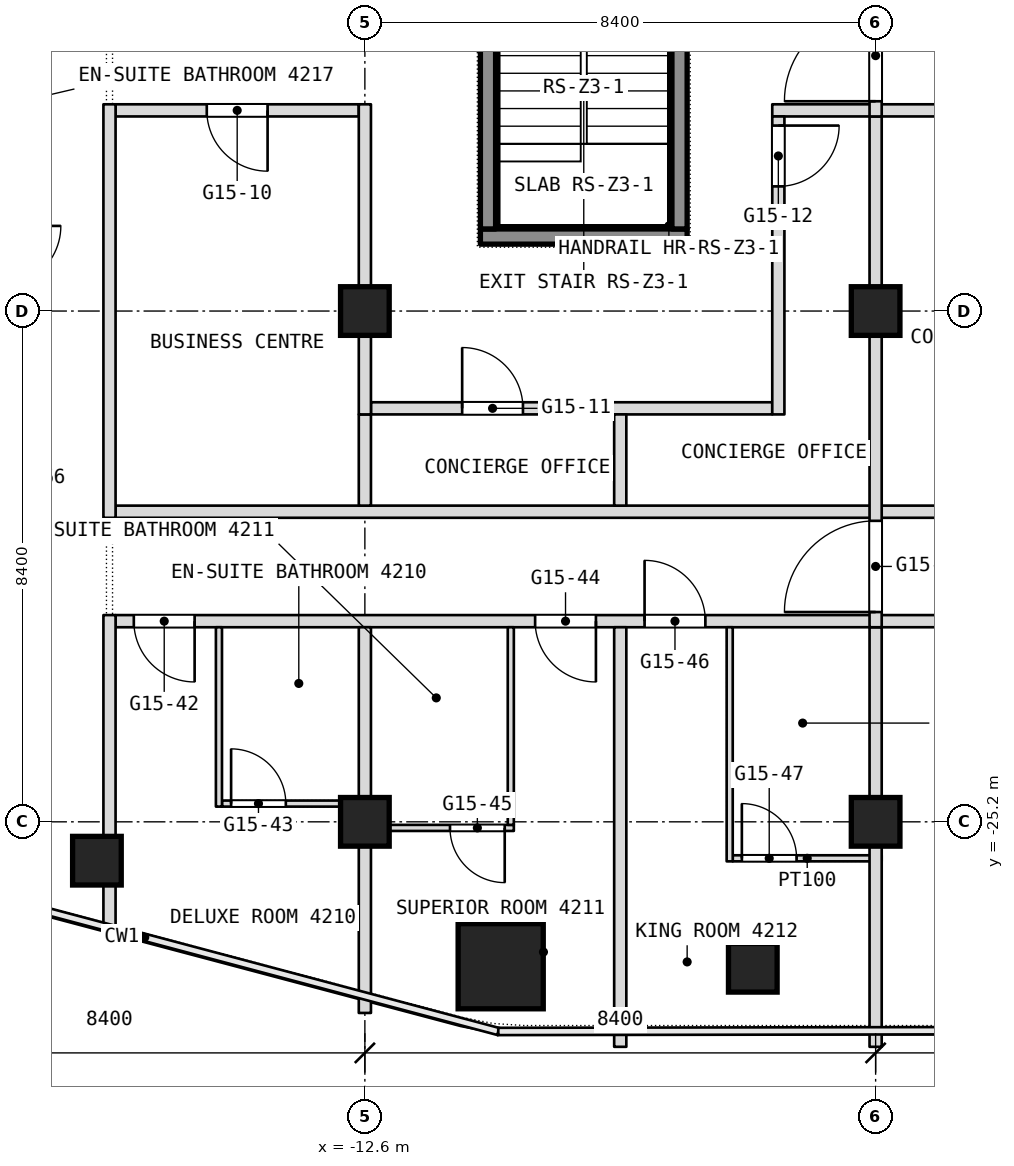
"""IFC4 building model, lengths in metres.
Left out: names, types, materials, properties, quantities, classifications, styles, units other than length and angle.
Written with IfcOpenShell. Run it as: python <this file> out.ifc"""

import sys

from ifc_helpers import new_model, si_unit, direction, frame, frame_2d, origin, origin_2d, place, context, subcontext, project, spatial, rectangle, extrude, element, fill, save


model = new_model("IFC4")
c1 = context("Model", 3, precision=1e-05, world=origin(), true_north=direction((0.0, 1.0)))
c2 = subcontext(c1, "Body", "Model", "MODEL_VIEW")
j1 = project(units=[si_unit("LENGTHUNIT", "METRE"), si_unit("PLANEANGLEUNIT", "RADIAN")], contexts=[c1])
p1 = place(None, origin())
s1 = spatial("IfcSite", under=j1, at=p1, CompositionType="ELEMENT")
p2 = place(p1, origin())
s2 = spatial("IfcBuilding", under=s1, at=p2, CompositionType="ELEMENT")
p3 = place(p2, frame((0.0, 0.0, 187.7)))
s3 = spatial("IfcBuildingStorey", under=s2, at=p3, CompositionType="ELEMENT", Elevation=187.7)
p4 = place(p3, frame((-10.366, -27.575, 0.0), z_axis=(0.0, 0.0, 1.0), x_axis=(1.0, 0.0, 0.0)))
e1 = element("IfcColumn", 1, at=p4, inside=s3, PredefinedType="COLUMN", context=c2, shape_type="SweptSolid", body=[
    extrude(rectangle(XDim=1.4, YDim=1.4, at=origin_2d()), origin(), (0.0, 0.0, 1.0), 3.6),
])
for number, where, z_axis, x_axis in (
    (2, (-12.6, -25.2, 0.0), (0.0, 0.0, 1.0), (1.0, 0.0, 0.0)),
    (3, (-12.6, -16.8, 0.0), (0.0, 0.0, 1.0), (1.0, 0.0, 0.0)),
    (4, (-4.2, -25.2, 0.0), (0.0, 0.0, 1.0), (1.0, 0.0, 0.0)),
    (5, (-4.2, -16.8, 0.0), (0.0, 0.0, 1.0), (1.0, 0.0, 0.0)),
    (6, (-6.22, -27.6, 0.0), (0.0, 0.0, 1.0), (1.0, 0.0, 0.0)),
    (7, (-17.007, -25.839, 0.0), (0.0, 0.0, 1.0), (1.0, 0.0, 0.0)),
):
    element("IfcColumn", number, at=place(p3, frame(where, z_axis=z_axis, x_axis=x_axis)), inside=s3, PredefinedType="COLUMN", context=c2, shape_type="SweptSolid", body=[
        extrude(rectangle(XDim=0.8, YDim=0.8, at=origin_2d()), origin(), (0.0, 0.0, 1.0), 3.6),
    ])
p5 = place(p3, frame((-6.55, -25.8, 0.0), z_axis=(0.0, 0.0, 1.0), x_axis=(1.0, 0.0, 0.0)))
e8 = element("IfcWall", 8, at=p5, inside=s3, PredefinedType="PARTITIONING", context=c2, shape_type="SweptSolid", body=[
    extrude(rectangle(XDim=2.45, YDim=0.1, at=frame_2d((1.225, 0.0))), origin(), (0.0, 0.0, 1.0), 3.34),
])
p6 = place(p5, frame((0.15, 0.0, 0.0)))
e9 = element("IfcOpeningElement", 9, at=p6, cuts=e8, PredefinedType="OPENING", context=c2, shape_type="SweptSolid", body=[
    extrude(rectangle(XDim=0.9, YDim=2.1, at=frame_2d((0.45, 1.05))), frame((0.0, 0.05, 0.0), z_axis=(0.0, -1.0, 0.0), x_axis=(1.0, 0.0, 0.0)), (0.0, 0.0, 1.0), 0.1),
])
p7 = place(p3, frame((-12.5, -25.3, 0.0), z_axis=(0.0, 0.0, 1.0), x_axis=(1.0, 0.0, 0.0)))
e10 = element("IfcWall", 10, at=p7, inside=s3, PredefinedType="PARTITIONING", context=c2, shape_type="SweptSolid", body=[
    extrude(rectangle(XDim=2.35, YDim=0.1, at=frame_2d((1.175, 0.0))), origin(), (0.0, 0.0, 1.0), 2.94),
])
p8 = place(p7, frame((1.3, 0.0, 0.0)))
e11 = element("IfcOpeningElement", 11, at=p8, cuts=e10, PredefinedType="OPENING", context=c2, shape_type="SweptSolid", body=[
    extrude(rectangle(XDim=0.9, YDim=2.1, at=frame_2d((0.45, 1.05))), frame((0.0, 0.05, 0.0), z_axis=(0.0, -1.0, 0.0), x_axis=(1.0, 0.0, 0.0)), (0.0, 0.0, 1.0), 0.1),
])
p9 = place(p3, frame((-14.95, -24.9, 0.0), z_axis=(0.0, 0.0, 1.0), x_axis=(1.0, 0.0, 0.0)))
e12 = element("IfcWall", 12, at=p9, inside=s3, PredefinedType="PARTITIONING", context=c2, shape_type="SweptSolid", body=[
    extrude(rectangle(XDim=2.45, YDim=0.1, at=frame_2d((1.225, 0.0))), origin(), (0.0, 0.0, 1.0), 3.34),
])
p10 = place(p9, frame((0.15, 0.0, 0.0)))
e13 = element("IfcOpeningElement", 13, at=p10, cuts=e12, PredefinedType="OPENING", context=c2, shape_type="SweptSolid", body=[
    extrude(rectangle(XDim=0.9, YDim=2.1, at=frame_2d((0.45, 1.05))), frame((0.0, 0.05, 0.0), z_axis=(0.0, -1.0, 0.0), x_axis=(1.0, 0.0, 0.0)), (0.0, 0.0, 1.0), 0.1),
])
p11 = place(p3, frame((-16.7, -21.9, 0.0), z_axis=(0.0, 0.0, 1.0), x_axis=(1.0, 0.0, 0.0)))
e14 = element("IfcWall", 14, at=p11, inside=s3, PredefinedType="PARTITIONING", context=c2, shape_type="SweptSolid", body=[
    extrude(rectangle(XDim=33.4, YDim=0.2, at=frame_2d((16.7, 0.0))), origin(), (0.0, 0.0, 1.0), 3.34),
])
p12 = place(p11, frame((0.3, 0.0, 0.0)))
e15 = element("IfcOpeningElement", 15, at=p12, cuts=e14, PredefinedType="OPENING", context=c2, shape_type="SweptSolid", body=[
    extrude(rectangle(XDim=1.0, YDim=2.1, at=frame_2d((0.5, 1.05))), frame((0.0, 0.1, 0.0), z_axis=(0.0, -1.0, 0.0), x_axis=(1.0, 0.0, 0.0)), (0.0, 0.0, 1.0), 0.2),
])
p13 = place(p11, frame((6.9, 0.0, 0.0)))
e16 = element("IfcOpeningElement", 16, at=p13, cuts=e14, PredefinedType="OPENING", context=c2, shape_type="SweptSolid", body=[
    extrude(rectangle(XDim=1.0, YDim=2.1, at=frame_2d((0.5, 1.05))), frame((0.0, 0.1, 0.0), z_axis=(0.0, -1.0, 0.0), x_axis=(1.0, 0.0, 0.0)), (0.0, 0.0, 1.0), 0.2),
])
p14 = place(p11, frame((8.7, 0.0, 0.0)))
e17 = element("IfcOpeningElement", 17, at=p14, cuts=e14, PredefinedType="OPENING", context=c2, shape_type="SweptSolid", body=[
    extrude(rectangle(XDim=1.0, YDim=2.1, at=frame_2d((0.5, 1.05))), frame((0.0, 0.1, 0.0), z_axis=(0.0, -1.0, 0.0), x_axis=(1.0, 0.0, 0.0)), (0.0, 0.0, 1.0), 0.2),
])
p15 = place(p11, frame((15.8, 0.0, 0.0)))
e18 = element("IfcOpeningElement", 18, at=p15, cuts=e14, PredefinedType="OPENING", context=c2, shape_type="SweptSolid", body=[
    extrude(rectangle(XDim=1.8, YDim=2.1, at=frame_2d((0.9, 1.05))), frame((0.0, 0.1, 0.0), z_axis=(0.0, -1.0, 0.0), x_axis=(1.0, 0.0, 0.0)), (0.0, 0.0, 1.0), 0.2),
])
p16 = place(p11, frame((26.65, 0.0, 0.0)))
e19 = element("IfcOpeningElement", 19, at=p16, cuts=e14, PredefinedType="OPENING", context=c2, shape_type="SweptSolid", body=[
    extrude(rectangle(XDim=1.1, YDim=2.1, at=frame_2d((0.55, 1.05))), frame((0.0, 0.1, 0.0), z_axis=(0.0, -1.0, 0.0), x_axis=(1.0, 0.0, 0.0)), (0.0, 0.0, 1.0), 0.2),
])
p17 = place(p11, frame((29.7, 0.0, 0.0)))
e20 = element("IfcOpeningElement", 20, at=p17, cuts=e14, PredefinedType="OPENING", context=c2, shape_type="SweptSolid", body=[
    extrude(rectangle(XDim=1.0, YDim=2.1, at=frame_2d((0.5, 1.05))), frame((0.0, 0.1, 0.0), z_axis=(0.0, -1.0, 0.0), x_axis=(1.0, 0.0, 0.0)), (0.0, 0.0, 1.0), 0.2),
])
p18 = place(p3, frame((-16.7, -20.1, 0.0), z_axis=(0.0, 0.0, 1.0), x_axis=(1.0, 0.0, 0.0)))
e21 = element("IfcWall", 21, at=p18, inside=s3, PredefinedType="PARTITIONING", context=c2, shape_type="SweptSolid", body=[
    extrude(rectangle(XDim=33.4, YDim=0.2, at=frame_2d((16.7, 0.0))), origin(), (0.0, 0.0, 1.0), 3.34),
])
p19 = place(p3, frame((-12.5, -18.4, 0.0), z_axis=(0.0, 0.0, 1.0), x_axis=(1.0, 0.0, 0.0)))
e22 = element("IfcWall", 22, at=p19, inside=s3, PredefinedType="PARTITIONING", context=c2, shape_type="SweptSolid", body=[
    extrude(rectangle(XDim=6.6, YDim=0.2, at=frame_2d((3.3, 0.0))), origin(), (0.0, 0.0, 1.0), 3.34),
])
p20 = place(p19, frame((1.5, 0.0, 0.0)))
e23 = element("IfcOpeningElement", 23, at=p20, cuts=e22, PredefinedType="OPENING", context=c2, shape_type="SweptSolid", body=[
    extrude(rectangle(XDim=1.0, YDim=2.1, at=frame_2d((0.5, 1.05))), frame((0.0, 0.1, 0.0), z_axis=(0.0, -1.0, 0.0), x_axis=(1.0, 0.0, 0.0)), (0.0, 0.0, 1.0), 0.2),
])
p21 = place(p3, frame((-16.7, -13.5, 0.0), z_axis=(0.0, 0.0, 1.0), x_axis=(1.0, 0.0, 0.0)))
e24 = element("IfcWall", 24, at=p21, inside=s3, PredefinedType="PARTITIONING", context=c2, shape_type="SweptSolid", body=[
    extrude(rectangle(XDim=4.0, YDim=0.2, at=frame_2d((2.0, 0.0))), origin(), (0.0, 0.0, 1.0), 3.34),
])
p22 = place(p21, frame((1.5, 0.0, 0.0)))
e25 = element("IfcOpeningElement", 25, at=p22, cuts=e24, PredefinedType="OPENING", context=c2, shape_type="SweptSolid", body=[
    extrude(rectangle(XDim=1.0, YDim=2.1, at=frame_2d((0.5, 1.05))), frame((0.0, 0.1, 0.0), z_axis=(0.0, -1.0, 0.0), x_axis=(1.0, 0.0, 0.0)), (0.0, 0.0, 1.0), 0.2),
])
p23 = place(p3, frame((-5.9, -13.5, 0.0), z_axis=(0.0, 0.0, 1.0), x_axis=(1.0, 0.0, 0.0)))
e26 = element("IfcWall", 26, at=p23, inside=s3, PredefinedType="PARTITIONING", context=c2, shape_type="SweptSolid", body=[
    extrude(rectangle(XDim=11.6, YDim=0.2, at=frame_2d((5.8, 0.0))), origin(), (0.0, 0.0, 1.0), 3.34),
])
p24 = place(p23, frame((3.3, 0.0, 0.0)))
e27 = element("IfcOpeningElement", 27, at=p24, cuts=e26, PredefinedType="OPENING", context=c2, shape_type="SweptSolid", body=[
    extrude(rectangle(XDim=1.0, YDim=2.1, at=frame_2d((0.5, 1.05))), frame((0.0, 0.1, 0.0), z_axis=(0.0, -1.0, 0.0), x_axis=(1.0, 0.0, 0.0)), (0.0, 0.0, 1.0), 0.2),
])
p25 = place(p23, frame((7.5, 0.0, 0.0)))
e28 = element("IfcOpeningElement", 28, at=p25, cuts=e26, PredefinedType="OPENING", context=c2, shape_type="SweptSolid", body=[
    extrude(rectangle(XDim=1.0, YDim=2.1, at=frame_2d((0.5, 1.05))), frame((0.0, 0.1, 0.0), z_axis=(0.0, -1.0, 0.0), x_axis=(1.0, 0.0, 0.0)), (0.0, 0.0, 1.0), 0.2),
])
p26 = place(p23, frame((10.45, 0.0, 0.0)))
e29 = element("IfcOpeningElement", 29, at=p26, cuts=e26, PredefinedType="OPENING", context=c2, shape_type="SweptSolid", body=[
    extrude(rectangle(XDim=1.0, YDim=2.1, at=frame_2d((0.5, 1.05))), frame((0.0, 0.1, 0.0), z_axis=(0.0, -1.0, 0.0), x_axis=(1.0, 0.0, 0.0)), (0.0, 0.0, 1.0), 0.2),
])
p27 = place(p3, frame((-4.2, -28.9, 0.0), z_axis=(0.0, 0.0, 1.0), x_axis=(0.0, 1.0, 0.0)))
e30 = element("IfcWall", 30, at=p27, inside=s3, PredefinedType="PARTITIONING", context=c2, shape_type="SweptSolid", body=[
    extrude(rectangle(XDim=6.9, YDim=0.2, at=frame_2d((3.45, 0.0))), origin(), (0.0, 0.0, 1.0), 3.34),
])
p28 = place(p3, frame((-4.2, -22.0, 0.0), z_axis=(0.0, 0.0, 1.0), x_axis=(0.0, 1.0, 0.0)))
e31 = element("IfcWall", 31, at=p28, inside=s3, PredefinedType="PARTITIONING", context=c2, shape_type="SweptSolid", body=[
    extrude(rectangle(XDim=8.4, YDim=0.2, at=frame_2d((4.2, 0.0))), origin(), (0.0, 0.0, 1.0), 3.34),
])
p29 = place(p28, frame((0.25, 0.0, 0.0)))
e32 = element("IfcOpeningElement", 32, at=p29, cuts=e31, PredefinedType="OPENING", context=c2, shape_type="SweptSolid", body=[
    extrude(rectangle(XDim=1.5, YDim=2.1, at=frame_2d((0.75, 1.05))), frame((0.0, 0.1, 0.0), z_axis=(0.0, -1.0, 0.0), x_axis=(1.0, 0.0, 0.0)), (0.0, 0.0, 1.0), 0.2),
])
p30 = place(p3, frame((-4.2, -13.6, 0.0), z_axis=(0.0, 0.0, 1.0), x_axis=(0.0, 1.0, 0.0)))
e33 = element("IfcWall", 33, at=p30, inside=s3, PredefinedType="PARTITIONING", context=c2, shape_type="SweptSolid", body=[
    extrude(rectangle(XDim=13.6, YDim=0.2, at=frame_2d((6.8, 0.0))), origin(), (0.0, 0.0, 1.0), 3.34),
])
p31 = place(p30, frame((11.95, 0.0, 0.0)))
e34 = element("IfcOpeningElement", 34, at=p31, cuts=e33, PredefinedType="OPENING", context=c2, shape_type="SweptSolid", body=[
    extrude(rectangle(XDim=1.5, YDim=2.1, at=frame_2d((0.75, 1.05))), frame((0.0, 0.1, 0.0), z_axis=(0.0, -1.0, 0.0), x_axis=(1.0, 0.0, 0.0)), (0.0, 0.0, 1.0), 0.2),
])
p32 = place(p30, frame((0.25, 0.0, 0.0)))
e35 = element("IfcOpeningElement", 35, at=p32, cuts=e33, PredefinedType="OPENING", context=c2, shape_type="SweptSolid", body=[
    extrude(rectangle(XDim=1.5, YDim=2.1, at=frame_2d((0.75, 1.05))), frame((0.0, 0.1, 0.0), z_axis=(0.0, -1.0, 0.0), x_axis=(1.0, 0.0, 0.0)), (0.0, 0.0, 1.0), 0.2),
])
p33 = place(p3, frame((-5.8, -18.5, 0.0), z_axis=(0.0, 0.0, 1.0), x_axis=(0.0, 1.0, 0.0)))
e36 = element("IfcWall", 36, at=p33, inside=s3, PredefinedType="PARTITIONING", context=c2, shape_type="SweptSolid", body=[
    extrude(rectangle(XDim=4.9, YDim=0.2, at=frame_2d((2.45, 0.0))), origin(), (0.0, 0.0, 1.0), 3.34),
])
p34 = place(p33, frame((3.75, 0.0, 0.0)))
e37 = element("IfcOpeningElement", 37, at=p34, cuts=e36, PredefinedType="OPENING", context=c2, shape_type="SweptSolid", body=[
    extrude(rectangle(XDim=1.0, YDim=2.1, at=frame_2d((0.5, 1.05))), frame((0.0, 0.1, 0.0), z_axis=(0.0, -1.0, 0.0), x_axis=(1.0, 0.0, 0.0)), (0.0, 0.0, 1.0), 0.2),
])
p35 = place(p3, frame((-6.6, -25.85, 0.0), z_axis=(0.0, 0.0, 1.0), x_axis=(0.0, 1.0, 0.0)))
e38 = element("IfcWall", 38, at=p35, inside=s3, PredefinedType="PARTITIONING", context=c2, shape_type="SweptSolid", body=[
    extrude(rectangle(XDim=3.85, YDim=0.1, at=frame_2d((1.925, 0.0))), origin(), (0.0, 0.0, 1.0), 3.34),
])
p36 = place(p3, frame((-8.4, -28.9, 0.0), z_axis=(0.0, 0.0, 1.0), x_axis=(0.0, 1.0, 0.0)))
e39 = element("IfcWall", 39, at=p36, inside=s3, PredefinedType="PARTITIONING", context=c2, shape_type="SweptSolid", body=[
    extrude(rectangle(XDim=6.9, YDim=0.2, at=frame_2d((3.45, 0.0))), origin(), (0.0, 0.0, 1.0), 3.34),
])
p37 = place(p3, frame((-8.4, -20.0, 0.0), z_axis=(0.0, 0.0, 1.0), x_axis=(0.0, 1.0, 0.0)))
e40 = element("IfcWall", 40, at=p37, inside=s3, PredefinedType="PARTITIONING", context=c2, shape_type="SweptSolid", body=[
    extrude(rectangle(XDim=1.5, YDim=0.2, at=frame_2d((0.75, 0.0))), origin(), (0.0, 0.0, 1.0), 3.34),
])
p38 = place(p3, frame((-10.2, -25.25, 0.0), z_axis=(0.0, 0.0, 1.0), x_axis=(0.0, 1.0, 0.0)))
e41 = element("IfcWall", 41, at=p38, inside=s3, PredefinedType="PARTITIONING", context=c2, shape_type="SweptSolid", body=[
    extrude(rectangle(XDim=3.25, YDim=0.1, at=frame_2d((1.625, 0.0))), origin(), (0.0, 0.0, 1.0), 3.34),
])
p39 = place(p3, frame((-12.6, -28.343, 0.0), z_axis=(0.0, 0.0, 1.0), x_axis=(0.0, 1.0, 0.0)))
e42 = element("IfcWall", 42, at=p39, inside=s3, PredefinedType="PARTITIONING", context=c2, shape_type="SweptSolid", body=[
    extrude(rectangle(XDim=6.343, YDim=0.2, at=frame_2d((3.171, 0.0))), origin(), (0.0, 0.0, 1.0), 3.34),
])
p40 = place(p3, frame((-12.6, -20.0, 0.0), z_axis=(0.0, 0.0, 1.0), x_axis=(0.0, 1.0, 0.0)))
e43 = element("IfcWall", 43, at=p40, inside=s3, PredefinedType="PARTITIONING", context=c2, shape_type="SweptSolid", body=[
    extrude(rectangle(XDim=1.5, YDim=0.2, at=frame_2d((0.75, 0.0))), origin(), (0.0, 0.0, 1.0), 3.34),
])
p41 = place(p3, frame((-12.6, -18.5, 0.0), z_axis=(0.0, 0.0, 1.0), x_axis=(0.0, 1.0, 0.0)))
e44 = element("IfcWall", 44, at=p41, inside=s3, PredefinedType="PARTITIONING", context=c2, shape_type="SweptSolid", body=[
    extrude(rectangle(XDim=5.1, YDim=0.2, at=frame_2d((2.55, 0.0))), origin(), (0.0, 0.0, 1.0), 3.34),
])
p42 = place(p3, frame((-15.0, -24.95, 0.0), z_axis=(0.0, 0.0, 1.0), x_axis=(0.0, 1.0, 0.0)))
e45 = element("IfcWall", 45, at=p42, inside=s3, PredefinedType="PARTITIONING", context=c2, shape_type="SweptSolid", body=[
    extrude(rectangle(XDim=2.95, YDim=0.1, at=frame_2d((1.475, 0.0))), origin(), (0.0, 0.0, 1.0), 3.34),
])
p43 = place(p3, frame((-16.8, -27.229, 0.0), z_axis=(0.0, 0.0, 1.0), x_axis=(0.0, 1.0, 0.0)))
e46 = element("IfcWall", 46, at=p43, inside=s3, PredefinedType="PARTITIONING", context=c2, shape_type="SweptSolid", body=[
    extrude(rectangle(XDim=5.429, YDim=0.2, at=frame_2d((2.714, 0.0))), origin(), (0.0, 0.0, 1.0), 3.34),
])
p44 = place(p3, frame((-16.8, -20.2, 0.0), z_axis=(0.0, 0.0, 1.0), x_axis=(0.0, 1.0, 0.0)))
e47 = element("IfcWall", 47, at=p44, inside=s3, PredefinedType="PARTITIONING", context=c2, shape_type="SweptSolid", body=[
    extrude(rectangle(XDim=6.8, YDim=0.2, at=frame_2d((3.4, 0.0))), origin(), (0.0, 0.0, 1.0), 3.34),
])
p45 = place(p3, frame((-10.7, -15.575, 0.1), z_axis=(0.0, 0.0, 1.0), x_axis=(1.0, 0.0, 0.0)))
e48 = element("IfcWall", 48, at=p45, inside=s3, PredefinedType="SHEAR", context=c2, shape_type="SweptSolid", body=[
    extrude(rectangle(XDim=3.4, YDim=0.25, at=frame_2d((1.7, 0.0))), origin(), (0.0, 0.0, 1.0), 3.6),
])
for number, where, z_axis, x_axis in (
    (49, (-10.575, -15.45, 0.1), (0.0, 0.0, 1.0), (0.0, 1.0, 0.0)),
    (50, (-7.425, -15.45, 0.1), (0.0, 0.0, 1.0), (0.0, 1.0, 0.0)),
):
    element("IfcWall", number, at=place(p3, frame(where, z_axis=z_axis, x_axis=x_axis)), inside=s3, PredefinedType="SHEAR", context=c2, shape_type="SweptSolid", body=[
        extrude(rectangle(XDim=5.7, YDim=0.25, at=frame_2d((2.85, 0.0))), origin(), (0.0, 0.0, 1.0), 3.6),
    ])
p46 = place(p6, origin())
e51 = element("IfcDoor", 51, at=p46, inside=s3, OperationType="SINGLE_SWING_LEFT", PredefinedType="DOOR", context=c2, shape_type="SweptSolid", body=[
    extrude(rectangle(XDim=0.9, YDim=2.1, at=frame_2d((0.45, 1.05))), frame((0.0, 0.025, 0.0), z_axis=(0.0, -1.0, 0.0), x_axis=(1.0, 0.0, 0.0)), (0.0, 0.0, 1.0), 0.05),
])
fill(e9, e51)
p47 = place(p8, origin())
e52 = element("IfcDoor", 52, at=p47, inside=s3, OperationType="SINGLE_SWING_RIGHT", PredefinedType="DOOR", context=c2, shape_type="SweptSolid", body=[
    extrude(rectangle(XDim=0.9, YDim=2.1, at=frame_2d((0.45, 1.05))), frame((0.0, 0.025, 0.0), z_axis=(0.0, -1.0, 0.0), x_axis=(1.0, 0.0, 0.0)), (0.0, 0.0, 1.0), 0.05),
])
fill(e11, e52)
p48 = place(p10, origin())
e53 = element("IfcDoor", 53, at=p48, inside=s3, OperationType="SINGLE_SWING_LEFT", PredefinedType="DOOR", context=c2, shape_type="SweptSolid", body=[
    extrude(rectangle(XDim=0.9, YDim=2.1, at=frame_2d((0.45, 1.05))), frame((0.0, 0.025, 0.0), z_axis=(0.0, -1.0, 0.0), x_axis=(1.0, 0.0, 0.0)), (0.0, 0.0, 1.0), 0.05),
])
fill(e13, e53)
p49 = place(p12, origin())
e54 = element("IfcDoor", 54, at=p49, inside=s3, OperationType="SINGLE_SWING_RIGHT", PredefinedType="DOOR", context=c2, shape_type="SweptSolid", body=[
    extrude(rectangle(XDim=1.0, YDim=2.1, at=frame_2d((0.5, 1.05))), frame((0.0, 0.025, 0.0), z_axis=(0.0, -1.0, 0.0), x_axis=(1.0, 0.0, 0.0)), (0.0, 0.0, 1.0), 0.05),
])
fill(e15, e54)
p50 = place(p13, origin())
e55 = element("IfcDoor", 55, at=p50, inside=s3, OperationType="SINGLE_SWING_RIGHT", PredefinedType="DOOR", context=c2, shape_type="SweptSolid", body=[
    extrude(rectangle(XDim=1.0, YDim=2.1, at=frame_2d((0.5, 1.05))), frame((0.0, 0.025, 0.0), z_axis=(0.0, -1.0, 0.0), x_axis=(1.0, 0.0, 0.0)), (0.0, 0.0, 1.0), 0.05),
])
fill(e16, e55)
p51 = place(p14, origin())
e56 = element("IfcDoor", 56, at=p51, inside=s3, OperationType="SINGLE_SWING_RIGHT", PredefinedType="DOOR", context=c2, shape_type="SweptSolid", body=[
    extrude(rectangle(XDim=1.0, YDim=2.1, at=frame_2d((0.5, 1.05))), frame((0.0, 0.025, 0.0), z_axis=(0.0, -1.0, 0.0), x_axis=(1.0, 0.0, 0.0)), (0.0, 0.0, 1.0), 0.05),
])
fill(e17, e56)
p52 = place(p20, origin())
e57 = element("IfcDoor", 57, at=p52, inside=s3, OperationType="SINGLE_SWING_RIGHT", PredefinedType="DOOR", context=c2, shape_type="SweptSolid", body=[
    extrude(rectangle(XDim=1.0, YDim=2.1, at=frame_2d((0.5, 1.05))), frame((0.0, 0.025, 0.0), z_axis=(0.0, -1.0, 0.0), x_axis=(1.0, 0.0, 0.0)), (0.0, 0.0, 1.0), 0.05),
])
fill(e23, e57)
p53 = place(p22, origin())
e58 = element("IfcDoor", 58, at=p53, inside=s3, OperationType="SINGLE_SWING_RIGHT", PredefinedType="DOOR", context=c2, shape_type="SweptSolid", body=[
    extrude(rectangle(XDim=1.0, YDim=2.1, at=frame_2d((0.5, 1.05))), frame((0.0, 0.025, 0.0), z_axis=(0.0, -1.0, 0.0), x_axis=(1.0, 0.0, 0.0)), (0.0, 0.0, 1.0), 0.05),
])
fill(e25, e58)
p54 = place(p34, origin())
e59 = element("IfcDoor", 59, at=p54, inside=s3, OperationType="SINGLE_SWING_RIGHT", PredefinedType="DOOR", context=c2, shape_type="SweptSolid", body=[
    extrude(rectangle(XDim=1.0, YDim=2.1, at=frame_2d((0.5, 1.05))), frame((0.0, 0.025, 0.0), z_axis=(0.0, -1.0, 0.0), x_axis=(1.0, 0.0, 0.0)), (0.0, 0.0, 1.0), 0.05),
])
fill(e37, e59)
p55 = place(p32, origin())
e60 = element("IfcDoor", 60, at=p55, inside=s3, OperationType="DOUBLE_DOOR_DOUBLE_SWING", PredefinedType="DOOR", context=c2, shape_type="SweptSolid", body=[
    extrude(rectangle(XDim=1.5, YDim=2.1, at=frame_2d((0.75, 1.05))), frame((0.0, 0.025, 0.0), z_axis=(0.0, -1.0, 0.0), x_axis=(1.0, 0.0, 0.0)), (0.0, 0.0, 1.0), 0.05),
])
fill(e35, e60)
p56 = place(p29, origin())
e61 = element("IfcDoor", 61, at=p56, inside=s3, OperationType="DOUBLE_DOOR_DOUBLE_SWING", PredefinedType="DOOR", context=c2, shape_type="SweptSolid", body=[
    extrude(rectangle(XDim=1.5, YDim=2.1, at=frame_2d((0.75, 1.05))), frame((0.0, 0.025, 0.0), z_axis=(0.0, -1.0, 0.0), x_axis=(1.0, 0.0, 0.0)), (0.0, 0.0, 1.0), 0.05),
])
fill(e32, e61)
save(model, sys.argv[1])
